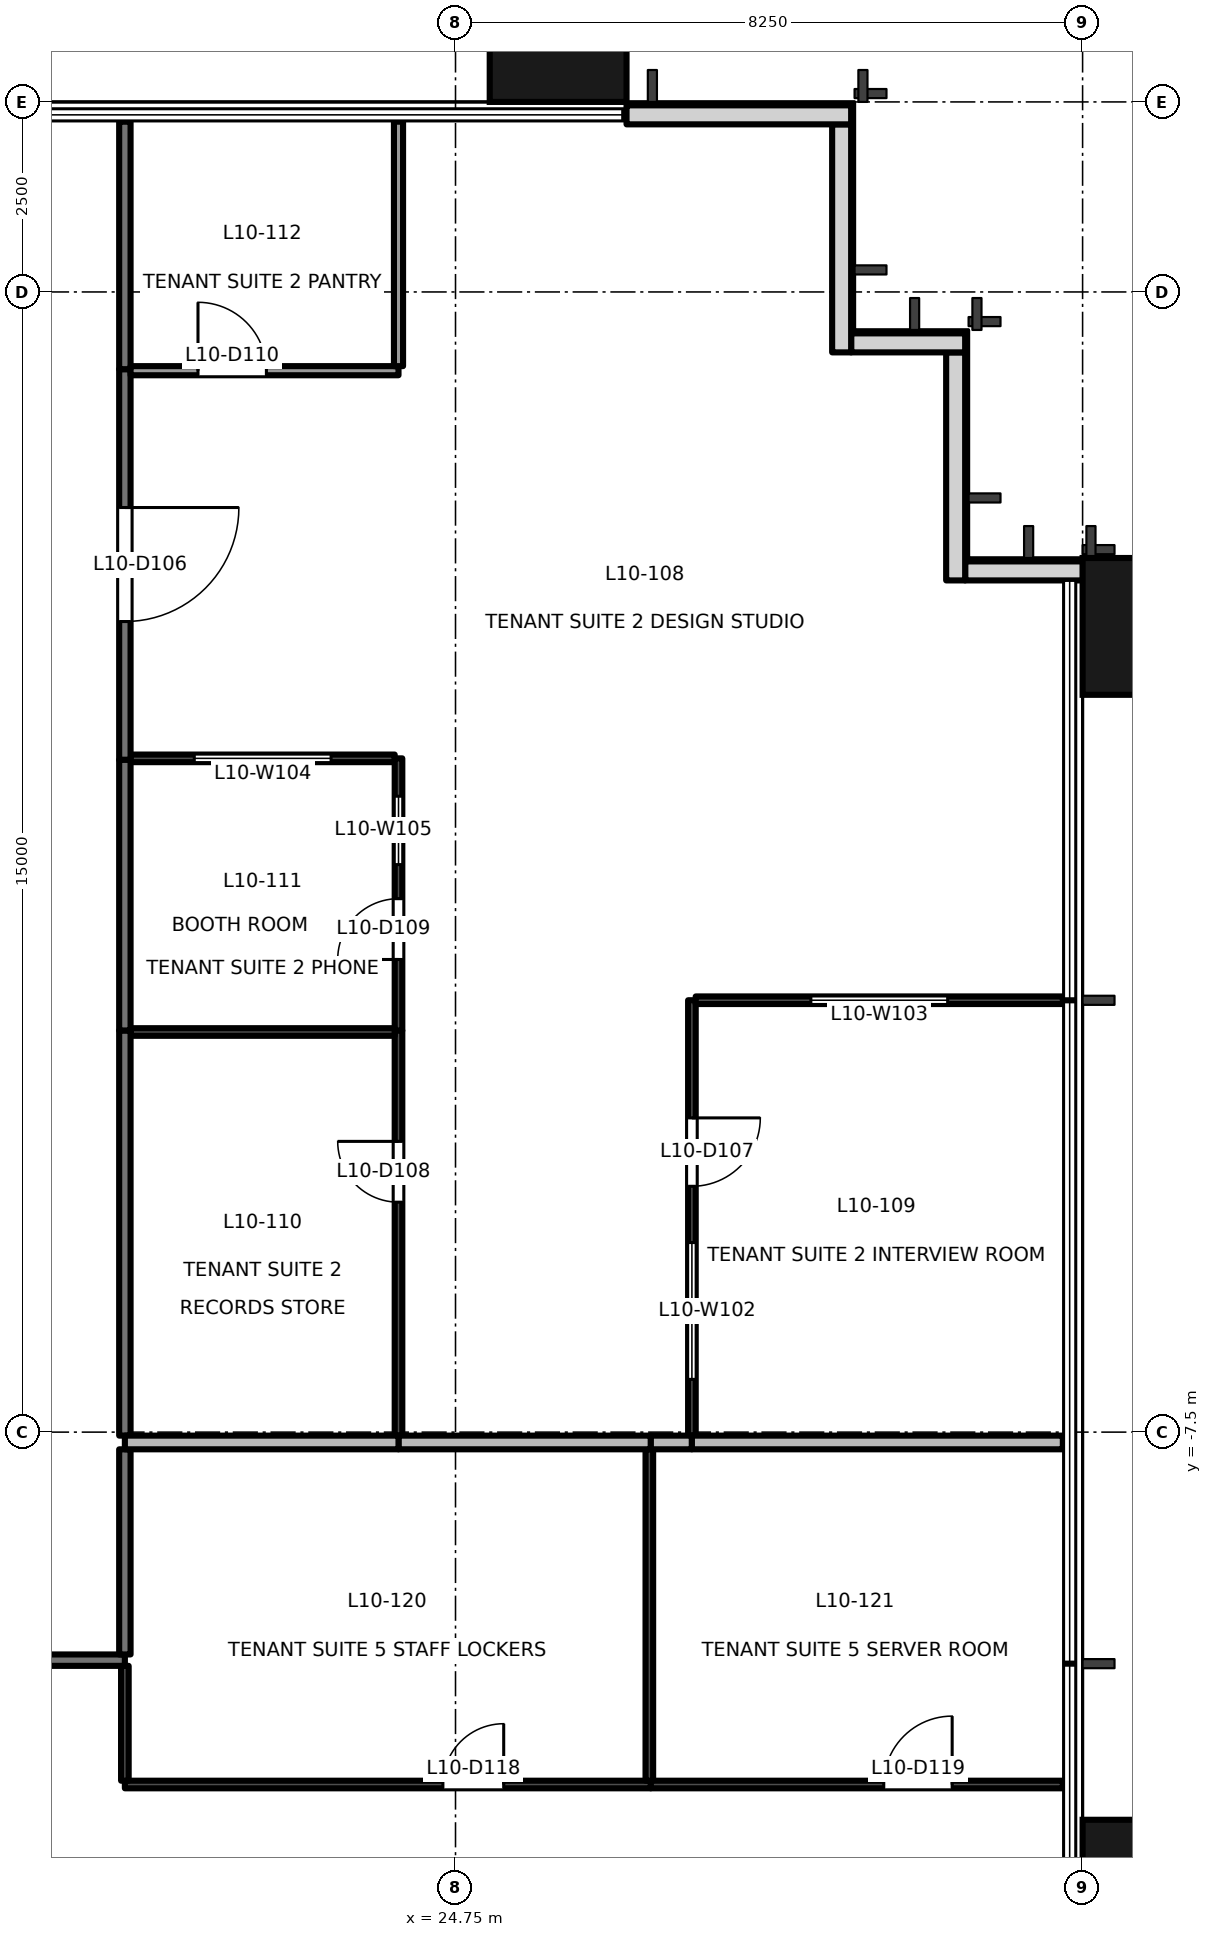
"""IFC4 building model, lengths in metres.
Left out: names, types, materials, properties, quantities, classifications, styles, units other than length and angle.
Written with IfcOpenShell. Run it as: python <this file> out.ifc"""

import sys

from ifc_helpers import new_model, si_unit, direction, frame, frame_2d, origin, origin_2d, place, context, subcontext, project, spatial, rectangle, extrude, element, fill, save


model = new_model("IFC4")
c1 = context("Model", 3, precision=1e-05, world=origin(), true_north=direction((0.0, 1.0)))
c2 = subcontext(c1, "Body", "Model", "MODEL_VIEW")
j1 = project(units=[si_unit("LENGTHUNIT", "METRE"), si_unit("PLANEANGLEUNIT", "RADIAN")], contexts=[c1])
p1 = place(None, origin())
s1 = spatial("IfcSite", under=j1, at=p1, CompositionType="ELEMENT")
p2 = place(p1, origin())
s2 = spatial("IfcBuilding", under=s1, at=p2, CompositionType="ELEMENT")
p3 = place(p2, frame((0.0, 0.0, 48.8)))
s3 = spatial("IfcBuildingStorey", under=s2, at=p3, CompositionType="ELEMENT", Elevation=48.8)
for number, where, z_axis, x_axis in (
    (1, (33.9, -13.5, -0.2), (0.0, 0.0, 1.0), (0.0, 1.0, 0.0)),
    (2, (33.9, 3.1, -0.2), (0.0, 0.0, 1.0), (0.0, 1.0, 0.0)),
    (3, (26.1, 10.9, -0.2), (0.0, 0.0, 1.0), (1.0, 0.0, 0.0)),
):
    element("IfcColumn", number, at=place(p3, frame(where, z_axis=z_axis, x_axis=x_axis)), inside=s3, PredefinedType="COLUMN", context=c2, shape_type="SweptSolid", body=[
        extrude(rectangle(XDim=1.8, YDim=1.8, at=origin_2d()), origin(), (0.0, 0.0, 1.0), 4.1),
    ])
p4 = place(p3, frame((33.005, 3.83, 0.0), z_axis=(0.0, 0.0, 1.0), x_axis=(-1.0, 0.0, 0.0)))
e4 = element("IfcWall", 4, at=p4, inside=s3, PredefinedType="SOLIDWALL", context=c2, shape_type="SweptSolid", body=[
    extrude(rectangle(XDim=1.55, YDim=0.25, at=frame_2d((0.775, 0.0))), origin(), (0.0, 0.0, 1.0), 3.9),
])
p5 = place(p3, frame((31.33, 3.705, 0.0), z_axis=(0.0, 0.0, 1.0), x_axis=(0.0, 1.0, 0.0)))
e5 = element("IfcWall", 5, at=p5, inside=s3, PredefinedType="SOLIDWALL", context=c2, shape_type="SweptSolid", body=[
    extrude(rectangle(XDim=3.0, YDim=0.25, at=frame_2d((1.5, 0.0))), origin(), (0.0, 0.0, 1.0), 3.9),
])
p6 = place(p3, frame((31.455, 6.83, 0.0), z_axis=(0.0, 0.0, 1.0), x_axis=(-1.0, 0.0, 0.0)))
e6 = element("IfcWall", 6, at=p6, inside=s3, PredefinedType="SOLIDWALL", context=c2, shape_type="SweptSolid", body=[
    extrude(rectangle(XDim=1.5, YDim=0.25, at=frame_2d((0.75, 0.0))), origin(), (0.0, 0.0, 1.0), 3.9),
])
p7 = place(p3, frame((29.83, 6.705, 0.0), z_axis=(0.0, 0.0, 1.0), x_axis=(0.0, 1.0, 0.0)))
e7 = element("IfcWall", 7, at=p7, inside=s3, PredefinedType="SOLIDWALL", context=c2, shape_type="SweptSolid", body=[
    extrude(rectangle(XDim=3.0, YDim=0.25, at=frame_2d((1.5, 0.0))), origin(), (0.0, 0.0, 1.0), 3.9),
])
p8 = place(p3, frame((29.955, 9.83, 0.0), z_axis=(0.0, 0.0, 1.0), x_axis=(-1.0, 0.0, 0.0)))
e8 = element("IfcWall", 8, at=p8, inside=s3, PredefinedType="SOLIDWALL", context=c2, shape_type="SweptSolid", body=[
    extrude(rectangle(XDim=2.955, YDim=0.25, at=frame_2d((1.478, 0.0))), origin(), (0.0, 0.0, 1.0), 3.9),
])
p9 = place(p3, frame((20.4, 6.484, 0.0), z_axis=(0.0, 0.0, 1.0), x_axis=(0.0, -1.0, 0.0)))
e9 = element("IfcWall", 9, at=p9, inside=s3, PredefinedType="PARTITIONING", context=c2, shape_type="SweptSolid", body=[
    extrude(rectangle(XDim=5.14, YDim=0.15, at=frame_2d((2.57, 0.0))), origin(), (0.0, 0.0, 1.0), 3.9),
])
p10 = place(p9, frame((1.82, 0.0, 0.0)))
e10 = element("IfcOpeningElement", 10, at=p10, cuts=e9, PredefinedType="OPENING", context=c2, shape_type="SweptSolid", body=[
    extrude(rectangle(XDim=1.5, YDim=2.1, at=frame_2d((0.75, 1.05))), frame((0.0, 0.085, 0.0), z_axis=(0.0, -1.0, 0.0), x_axis=(1.0, 0.0, 0.0)), (0.0, 0.0, 1.0), 0.171),
])
p11 = place(p3, frame((20.4, -2.216, 0.0), z_axis=(0.0, 0.0, 1.0), x_axis=(0.0, -1.0, 0.0)))
e11 = element("IfcWall", 11, at=p11, inside=s3, PredefinedType="PARTITIONING", context=c2, shape_type="SweptSolid", body=[
    extrude(rectangle(XDim=5.33, YDim=0.15, at=frame_2d((2.665, 0.0))), origin(), (0.0, 0.0, 1.0), 3.3),
])
p12 = place(p3, frame((20.4, 1.344, 0.0), z_axis=(0.0, 0.0, 1.0), x_axis=(0.0, -1.0, 0.0)))
e12 = element("IfcWall", 12, at=p12, inside=s3, PredefinedType="PARTITIONING", context=c2, shape_type="SweptSolid", body=[
    extrude(rectangle(XDim=3.56, YDim=0.15, at=frame_2d((1.78, 0.0))), origin(), (0.0, 0.0, 1.0), 3.3),
])
p13 = place(p3, frame((20.4, 9.74, 0.0), z_axis=(0.0, 0.0, 1.0), x_axis=(0.0, -1.0, 0.0)))
e13 = element("IfcWall", 13, at=p13, inside=s3, PredefinedType="PARTITIONING", context=c2, shape_type="SweptSolid", body=[
    extrude(rectangle(XDim=3.256, YDim=0.15, at=frame_2d((1.628, 0.0))), origin(), (0.0, 0.0, 1.0), 3.9),
])
p14 = place(p3, frame((20.4, -10.5, 0.0), z_axis=(0.0, 0.0, 1.0), x_axis=(-1.0, 0.0, 0.0)))
e14 = element("IfcWall", 14, at=p14, inside=s3, PredefinedType="PARTITIONING", context=c2, shape_type="SweptSolid", body=[
    extrude(rectangle(XDim=14.31, YDim=0.15, at=frame_2d((7.155, 0.0))), origin(), (0.0, 0.0, 1.0), 2.5),
])
p15 = place(p14, frame((3.252, 0.0, 0.0)))
e15 = element("IfcOpeningElement", 15, at=p15, cuts=e14, PredefinedType="OPENING", context=c2, shape_type="SweptSolid", body=[
    extrude(rectangle(XDim=1.8, YDim=2.1, at=frame_2d((0.9, 1.05))), frame((0.0, 0.085, 0.0), z_axis=(0.0, -1.0, 0.0), x_axis=(1.0, 0.0, 0.0)), (0.0, 0.0, 1.0), 0.171),
])
p16 = place(p3, frame((20.4, -7.726, 0.0), z_axis=(0.0, 0.0, 1.0), x_axis=(0.0, -1.0, 0.0)))
e16 = element("IfcWall", 16, at=p16, inside=s3, PredefinedType="PARTITIONING", context=c2, shape_type="SweptSolid", body=[
    extrude(rectangle(XDim=2.699, YDim=0.15, at=frame_2d((1.35, 0.0))), origin(), (0.0, 0.0, 1.0), 3.3),
])
p17 = place(p3, frame((27.86, -1.818, 0.0), z_axis=(0.0, 0.0, 1.0), x_axis=(0.0, -1.0, 0.0)))
e17 = element("IfcWall", 17, at=p17, inside=s3, PredefinedType="PARTITIONING", context=c2, shape_type="SweptSolid", body=[
    extrude(rectangle(XDim=5.728, YDim=0.1, at=frame_2d((2.864, 0.0))), origin(), (0.0, 0.0, 1.0), 3.3),
])
p18 = place(p17, frame((1.548, 0.0, 0.0)))
e18 = element("IfcOpeningElement", 18, at=p18, cuts=e17, PredefinedType="OPENING", context=c2, shape_type="SweptSolid", body=[
    extrude(rectangle(XDim=0.9, YDim=2.1, at=frame_2d((0.45, 1.05))), frame((0.0, 0.061, 0.0), z_axis=(0.0, -1.0, 0.0), x_axis=(1.0, 0.0, 0.0)), (0.0, 0.0, 1.0), 0.121),
])
p19 = place(p17, frame((3.188, 0.0, 0.9)))
e19 = element("IfcOpeningElement", 19, at=p19, cuts=e17, PredefinedType="OPENING", context=c2, shape_type="SweptSolid", body=[
    extrude(rectangle(XDim=1.8, YDim=1.2, at=frame_2d((0.9, 0.6))), frame((0.0, 0.061, 0.0), z_axis=(0.0, -1.0, 0.0), x_axis=(1.0, 0.0, 0.0)), (0.0, 0.0, 1.0), 0.121),
])
p20 = place(p3, frame((32.74, -1.818, 0.0), z_axis=(0.0, 0.0, 1.0), x_axis=(-1.0, 0.0, 0.0)))
e20 = element("IfcWall", 20, at=p20, inside=s3, PredefinedType="PARTITIONING", context=c2, shape_type="SweptSolid", body=[
    extrude(rectangle(XDim=4.83, YDim=0.1, at=frame_2d((2.415, 0.0))), origin(), (0.0, 0.0, 1.0), 3.9),
])
p21 = place(p20, frame((1.515, 0.0, 0.9)))
e21 = element("IfcOpeningElement", 21, at=p21, cuts=e20, PredefinedType="OPENING", context=c2, shape_type="SweptSolid", body=[
    extrude(rectangle(XDim=1.8, YDim=1.2, at=frame_2d((0.9, 0.6))), frame((0.0, 0.061, 0.0), z_axis=(0.0, -1.0, 0.0), x_axis=(1.0, 0.0, 0.0)), (0.0, 0.0, 1.0), 0.121),
])
p22 = place(p3, frame((24.0, -7.546, 0.0), z_axis=(0.0, 0.0, 1.0), x_axis=(0.0, 1.0, 0.0)))
e22 = element("IfcWall", 22, at=p22, inside=s3, PredefinedType="PARTITIONING", context=c2, shape_type="SweptSolid", body=[
    extrude(rectangle(XDim=5.33, YDim=0.1, at=frame_2d((2.665, 0.0))), origin(), (0.0, 0.0, 1.0), 3.3),
])
p23 = place(p22, frame((3.071, 0.0, 0.0)))
e23 = element("IfcOpeningElement", 23, at=p23, cuts=e22, PredefinedType="OPENING", context=c2, shape_type="SweptSolid", body=[
    extrude(rectangle(XDim=0.8, YDim=2.1, at=frame_2d((0.4, 1.05))), frame((0.0, 0.061, 0.0), z_axis=(0.0, -1.0, 0.0), x_axis=(1.0, 0.0, 0.0)), (0.0, 0.0, 1.0), 0.121),
])
p24 = place(p3, frame((23.95, 1.364, 0.0), z_axis=(0.0, 0.0, 1.0), x_axis=(-1.0, 0.0, 0.0)))
e24 = element("IfcWall", 24, at=p24, inside=s3, PredefinedType="PARTITIONING", context=c2, shape_type="SweptSolid", body=[
    extrude(rectangle(XDim=3.475, YDim=0.1, at=frame_2d((1.737, 0.0))), origin(), (0.0, 0.0, 1.0), 3.9),
])
p25 = place(p24, frame((0.837, 0.0, 0.9)))
e25 = element("IfcOpeningElement", 25, at=p25, cuts=e24, PredefinedType="OPENING", context=c2, shape_type="SweptSolid", body=[
    extrude(rectangle(XDim=1.8, YDim=1.2, at=frame_2d((0.9, 0.6))), frame((0.0, 0.061, 0.0), z_axis=(0.0, -1.0, 0.0), x_axis=(1.0, 0.0, 0.0)), (0.0, 0.0, 1.0), 0.121),
])
p26 = place(p3, frame((24.0, -2.216, 0.0), z_axis=(0.0, 0.0, 1.0), x_axis=(0.0, 1.0, 0.0)))
e26 = element("IfcWall", 26, at=p26, inside=s3, PredefinedType="PARTITIONING", context=c2, shape_type="SweptSolid", body=[
    extrude(rectangle(XDim=3.58, YDim=0.1, at=frame_2d((1.79, 0.0))), origin(), (0.0, 0.0, 1.0), 3.3),
])
p27 = place(p26, frame((0.934, 0.0, 0.0)))
e27 = element("IfcOpeningElement", 27, at=p27, cuts=e26, PredefinedType="OPENING", context=c2, shape_type="SweptSolid", body=[
    extrude(rectangle(XDim=0.8, YDim=2.1, at=frame_2d((0.4, 1.05))), frame((0.0, 0.061, 0.0), z_axis=(0.0, -1.0, 0.0), x_axis=(1.0, 0.0, 0.0)), (0.0, 0.0, 1.0), 0.121),
])
p28 = place(p26, frame((2.182, 0.0, 0.9)))
e28 = element("IfcOpeningElement", 28, at=p28, cuts=e26, PredefinedType="OPENING", context=c2, shape_type="SweptSolid", body=[
    extrude(rectangle(XDim=0.9, YDim=1.2, at=frame_2d((0.45, 0.6))), frame((0.0, 0.061, 0.0), z_axis=(0.0, -1.0, 0.0), x_axis=(1.0, 0.0, 0.0)), (0.0, 0.0, 1.0), 0.121),
])
p29 = place(p3, frame((20.475, 6.464, 0.0), z_axis=(0.0, 0.0, 1.0), x_axis=(1.0, 0.0, 0.0)))
e29 = element("IfcWall", 29, at=p29, inside=s3, PredefinedType="PARTITIONING", context=c2, shape_type="SweptSolid", body=[
    extrude(rectangle(XDim=3.525, YDim=0.12, at=frame_2d((1.762, 0.0))), origin(), (0.0, 0.0, 1.0), 3.9),
])
p30 = place(p29, frame((0.887, 0.0, 0.0)))
e30 = element("IfcOpeningElement", 30, at=p30, cuts=e29, PredefinedType="OPENING", context=c2, shape_type="SweptSolid", body=[
    extrude(rectangle(XDim=0.9, YDim=2.1, at=frame_2d((0.45, 1.05))), frame((0.0, 0.071, 0.0), z_axis=(0.0, -1.0, 0.0), x_axis=(1.0, 0.0, 0.0)), (0.0, 0.0, 1.0), 0.141),
])
p31 = place(p3, frame((24.0, 6.524, 0.0), z_axis=(0.0, 0.0, 1.0), x_axis=(0.0, 1.0, 0.0)))
e31 = element("IfcWall", 31, at=p31, inside=s3, PredefinedType="PARTITIONING", context=c2, shape_type="SweptSolid", body=[
    extrude(rectangle(XDim=3.216, YDim=0.12, at=frame_2d((1.608, 0.0))), origin(), (0.0, 0.0, 1.0), 3.9),
])
p32 = place(p3, frame((27.32, -7.636, 0.0), z_axis=(0.0, 0.0, 1.0), x_axis=(-1.0, 0.0, 0.0)))
e32 = element("IfcWall", 32, at=p32, inside=s3, PredefinedType="PARTITIONING", context=c2, shape_type="SweptSolid", body=[
    extrude(rectangle(XDim=3.32, YDim=0.18, at=frame_2d((1.66, 0.0))), origin(), (0.0, 0.0, 1.0), 3.9),
])
p33 = place(p3, frame((27.86, -7.636, 0.0), z_axis=(0.0, 0.0, 1.0), x_axis=(-1.0, 0.0, 0.0)))
e33 = element("IfcWall", 33, at=p33, inside=s3, PredefinedType="PARTITIONING", context=c2, shape_type="SweptSolid", body=[
    extrude(rectangle(XDim=0.54, YDim=0.18, at=frame_2d((0.27, 0.0))), origin(), (0.0, 0.0, 1.0), 3.9),
])
p34 = place(p3, frame((32.74, -7.636, 0.0), z_axis=(0.0, 0.0, 1.0), x_axis=(-1.0, 0.0, 0.0)))
e34 = element("IfcWall", 34, at=p34, inside=s3, PredefinedType="PARTITIONING", context=c2, shape_type="SweptSolid", body=[
    extrude(rectangle(XDim=4.88, YDim=0.18, at=frame_2d((2.44, 0.0))), origin(), (0.0, 0.0, 1.0), 3.9),
])
p35 = place(p3, frame((20.475, -2.236, 0.0), z_axis=(0.0, 0.0, 1.0), x_axis=(1.0, 0.0, 0.0)))
e35 = element("IfcWall", 35, at=p35, inside=s3, PredefinedType="PARTITIONING", context=c2, shape_type="SweptSolid", body=[
    extrude(rectangle(XDim=3.475, YDim=0.1, at=frame_2d((1.737, 0.0))), origin(), (0.0, 0.0, 1.0), 3.9),
])
p36 = place(p3, frame((24.0, -7.636, 0.0), z_axis=(0.0, 0.0, 1.0), x_axis=(-1.0, 0.0, 0.0)))
e36 = element("IfcWall", 36, at=p36, inside=s3, PredefinedType="PARTITIONING", context=c2, shape_type="SweptSolid", body=[
    extrude(rectangle(XDim=3.6, YDim=0.18, at=frame_2d((1.8, 0.0))), origin(), (0.0, 0.0, 1.0), 3.9),
])
p37 = place(p3, frame((20.4, -12.136, 0.0), z_axis=(0.0, 0.0, 1.0), x_axis=(1.0, 0.0, 0.0)))
e37 = element("IfcWall", 37, at=p37, inside=s3, PredefinedType="PARTITIONING", context=c2, shape_type="SweptSolid", body=[
    extrude(rectangle(XDim=6.92, YDim=0.1, at=frame_2d((3.46, 0.0))), origin(), (0.0, 0.0, 1.0), 3.9),
])
p38 = place(p37, frame((4.184, 0.0, 0.0)))
e38 = element("IfcOpeningElement", 38, at=p38, cuts=e37, PredefinedType="OPENING", context=c2, shape_type="SweptSolid", body=[
    extrude(rectangle(XDim=0.8, YDim=2.1, at=frame_2d((0.4, 1.05))), frame((0.0, 0.061, 0.0), z_axis=(0.0, -1.0, 0.0), x_axis=(1.0, 0.0, 0.0)), (0.0, 0.0, 1.0), 0.121),
])
p39 = place(p3, frame((20.4, -10.575, 0.0), z_axis=(0.0, 0.0, 1.0), x_axis=(0.0, -1.0, 0.0)))
e39 = element("IfcWall", 39, at=p39, inside=s3, PredefinedType="PARTITIONING", context=c2, shape_type="SweptSolid", body=[
    extrude(rectangle(XDim=1.511, YDim=0.1, at=frame_2d((0.755, 0.0))), origin(), (0.0, 0.0, 1.0), 3.9),
])
p40 = place(p3, frame((27.32, -12.136, 0.0), z_axis=(0.0, 0.0, 1.0), x_axis=(1.0, 0.0, 0.0)))
e40 = element("IfcWall", 40, at=p40, inside=s3, PredefinedType="PARTITIONING", context=c2, shape_type="SweptSolid", body=[
    extrude(rectangle(XDim=5.42, YDim=0.1, at=frame_2d((2.71, 0.0))), origin(), (0.0, 0.0, 1.0), 3.9),
])
p41 = place(p40, frame((3.064, 0.0, 0.0)))
e41 = element("IfcOpeningElement", 41, at=p41, cuts=e40, PredefinedType="OPENING", context=c2, shape_type="SweptSolid", body=[
    extrude(rectangle(XDim=0.9, YDim=2.1, at=frame_2d((0.45, 1.05))), frame((0.0, 0.061, 0.0), z_axis=(0.0, -1.0, 0.0), x_axis=(1.0, 0.0, 0.0)), (0.0, 0.0, 1.0), 0.121),
])
p42 = place(p3, frame((27.3, -7.726, 0.0), z_axis=(0.0, 0.0, 1.0), x_axis=(0.0, -1.0, 0.0)))
e42 = element("IfcWall", 42, at=p42, inside=s3, PredefinedType="PARTITIONING", context=c2, shape_type="SweptSolid", body=[
    extrude(rectangle(XDim=4.36, YDim=0.1, at=frame_2d((2.18, 0.0))), origin(), (0.0, 0.0, 1.0), 3.3),
])
p43 = place(p10, origin())
e43 = element("IfcDoor", 43, at=p43, inside=s3, OperationType="DOUBLE_DOOR_SINGLE_SWING", PredefinedType="DOOR", context=c2, shape_type="SweptSolid", body=[
    extrude(rectangle(XDim=1.5, YDim=2.1, at=frame_2d((0.75, 1.05))), frame((0.0, 0.025, 0.0), z_axis=(0.0, -1.0, 0.0), x_axis=(1.0, 0.0, 0.0)), (0.0, 0.0, 1.0), 0.05),
])
fill(e10, e43)
p44 = place(p18, origin())
e44 = element("IfcDoor", 44, at=p44, inside=s3, OperationType="SINGLE_SWING_LEFT", PredefinedType="DOOR", context=c2, shape_type="SweptSolid", body=[
    extrude(rectangle(XDim=0.9, YDim=2.1, at=frame_2d((0.45, 1.05))), frame((0.0, 0.025, 0.0), z_axis=(0.0, -1.0, 0.0), x_axis=(1.0, 0.0, 0.0)), (0.0, 0.0, 1.0), 0.05),
])
fill(e18, e44)
p45 = place(p23, origin())
e45 = element("IfcDoor", 45, at=p45, inside=s3, OperationType="SINGLE_SWING_RIGHT", PredefinedType="DOOR", context=c2, shape_type="SweptSolid", body=[
    extrude(rectangle(XDim=0.8, YDim=2.1, at=frame_2d((0.4, 1.05))), frame((0.0, 0.025, 0.0), z_axis=(0.0, -1.0, 0.0), x_axis=(1.0, 0.0, 0.0)), (0.0, 0.0, 1.0), 0.05),
])
fill(e23, e45)
p46 = place(p27, origin())
e46 = element("IfcDoor", 46, at=p46, inside=s3, OperationType="SINGLE_SWING_LEFT", PredefinedType="DOOR", context=c2, shape_type="SweptSolid", body=[
    extrude(rectangle(XDim=0.8, YDim=2.1, at=frame_2d((0.4, 1.05))), frame((0.0, 0.025, 0.0), z_axis=(0.0, -1.0, 0.0), x_axis=(1.0, 0.0, 0.0)), (0.0, 0.0, 1.0), 0.05),
])
fill(e27, e46)
p47 = place(p30, origin())
e47 = element("IfcDoor", 47, at=p47, inside=s3, OperationType="SINGLE_SWING_LEFT", PredefinedType="DOOR", context=c2, shape_type="SweptSolid", body=[
    extrude(rectangle(XDim=0.9, YDim=2.1, at=frame_2d((0.45, 1.05))), frame((0.0, 0.025, 0.0), z_axis=(0.0, -1.0, 0.0), x_axis=(1.0, 0.0, 0.0)), (0.0, 0.0, 1.0), 0.05),
])
fill(e30, e47)
p48 = place(p38, origin())
e48 = element("IfcDoor", 48, at=p48, inside=s3, OperationType="SINGLE_SWING_RIGHT", PredefinedType="DOOR", context=c2, shape_type="SweptSolid", body=[
    extrude(rectangle(XDim=0.8, YDim=2.1, at=frame_2d((0.4, 1.05))), frame((0.0, 0.025, 0.0), z_axis=(0.0, -1.0, 0.0), x_axis=(1.0, 0.0, 0.0)), (0.0, 0.0, 1.0), 0.05),
])
fill(e38, e48)
p49 = place(p41, origin())
e49 = element("IfcDoor", 49, at=p49, inside=s3, OperationType="SINGLE_SWING_RIGHT", PredefinedType="DOOR", context=c2, shape_type="SweptSolid", body=[
    extrude(rectangle(XDim=0.9, YDim=2.1, at=frame_2d((0.45, 1.05))), frame((0.0, 0.025, 0.0), z_axis=(0.0, -1.0, 0.0), x_axis=(1.0, 0.0, 0.0)), (0.0, 0.0, 1.0), 0.05),
])
fill(e41, e49)
p50 = place(p19, origin())
e50 = element("IfcWindow", 50, at=p50, inside=s3, PartitioningType="SINGLE_PANEL", PredefinedType="WINDOW", context=c2, shape_type="SweptSolid", body=[
    extrude(rectangle(XDim=1.8, YDim=1.2, at=frame_2d((0.9, 0.6))), frame((0.0, 0.03, 0.0), z_axis=(0.0, -1.0, 0.0), x_axis=(1.0, 0.0, 0.0)), (0.0, 0.0, 1.0), 0.06),
])
fill(e19, e50)
p51 = place(p21, origin())
e51 = element("IfcWindow", 51, at=p51, inside=s3, PartitioningType="SINGLE_PANEL", PredefinedType="WINDOW", context=c2, shape_type="SweptSolid", body=[
    extrude(rectangle(XDim=1.8, YDim=1.2, at=frame_2d((0.9, 0.6))), frame((0.0, 0.03, 0.0), z_axis=(0.0, -1.0, 0.0), x_axis=(1.0, 0.0, 0.0)), (0.0, 0.0, 1.0), 0.06),
])
fill(e21, e51)
p52 = place(p25, origin())
e52 = element("IfcWindow", 52, at=p52, inside=s3, PartitioningType="SINGLE_PANEL", PredefinedType="WINDOW", context=c2, shape_type="SweptSolid", body=[
    extrude(rectangle(XDim=1.8, YDim=1.2, at=frame_2d((0.9, 0.6))), frame((0.0, 0.03, 0.0), z_axis=(0.0, -1.0, 0.0), x_axis=(1.0, 0.0, 0.0)), (0.0, 0.0, 1.0), 0.06),
])
fill(e25, e52)
p53 = place(p28, origin())
e53 = element("IfcWindow", 53, at=p53, inside=s3, PartitioningType="SINGLE_PANEL", PredefinedType="WINDOW", context=c2, shape_type="SweptSolid", body=[
    extrude(rectangle(XDim=0.9, YDim=1.2, at=frame_2d((0.45, 0.6))), frame((0.0, 0.03, 0.0), z_axis=(0.0, -1.0, 0.0), x_axis=(1.0, 0.0, 0.0)), (0.0, 0.0, 1.0), 0.06),
])
fill(e28, e53)
save(model, sys.argv[1])
